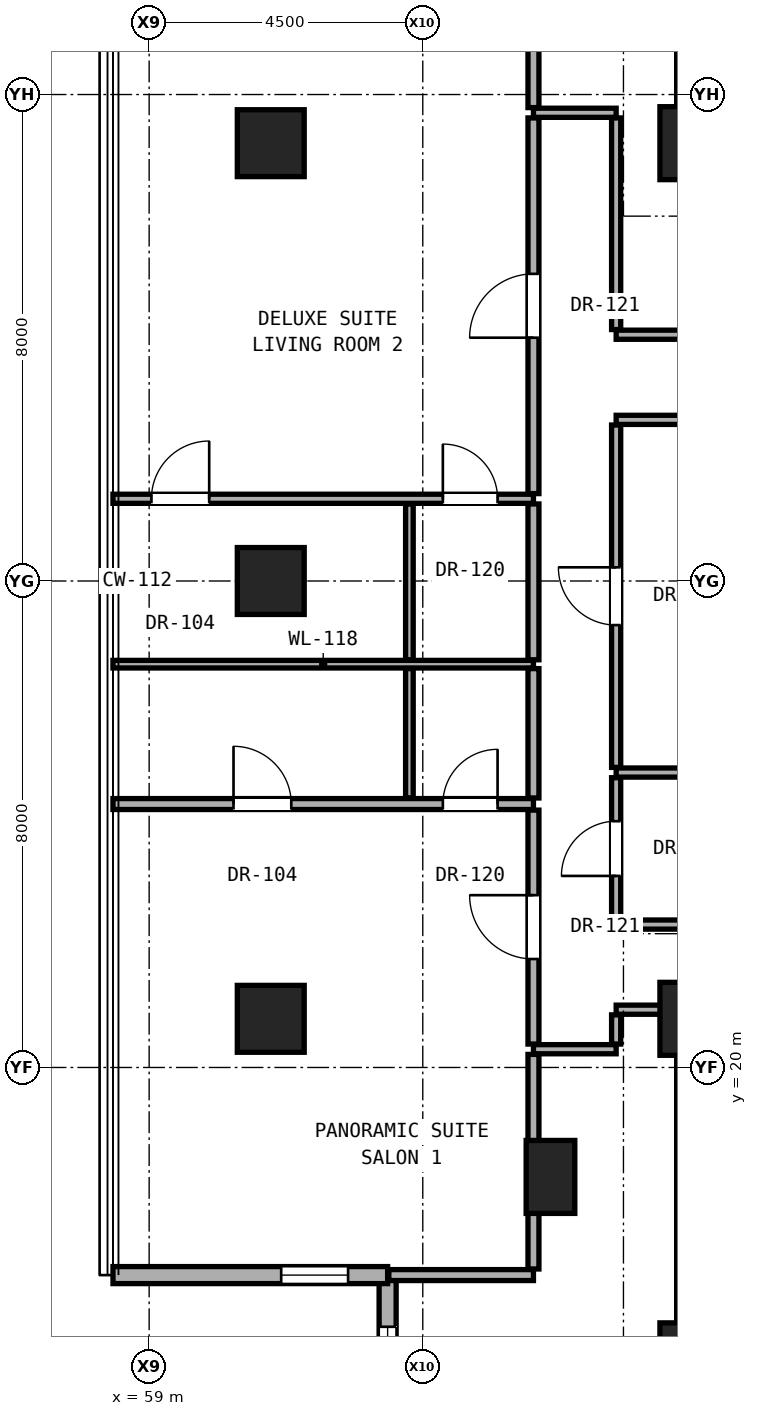
"""IFC4 building model, lengths in metres.
Left out: names, types, materials, properties, quantities, classifications, styles, units other than length and angle.
Written with IfcOpenShell. Run it as: python <this file> out.ifc"""

import sys

from ifc_helpers import new_model, si_unit, direction, frame, frame_2d, origin, origin_2d, place, context, subcontext, project, spatial, rectangle, hollow_rectangle, extrude, element, fill, save


model = new_model("IFC4")
c1 = context("Model", 3, precision=1e-05, world=origin(), true_north=direction((0.0, 1.0)))
c2 = subcontext(c1, "Body", "Model", "MODEL_VIEW")
j1 = project(units=[si_unit("LENGTHUNIT", "METRE"), si_unit("PLANEANGLEUNIT", "RADIAN")], contexts=[c1])
p1 = place(None, origin())
s1 = spatial("IfcSite", under=j1, at=p1, CompositionType="ELEMENT")
p2 = place(p1, origin())
s2 = spatial("IfcBuilding", under=s1, at=p2, CompositionType="ELEMENT")
p3 = place(p2, frame((0.0, 0.0, 101.6)))
s3 = spatial("IfcBuildingStorey", under=s2, at=p3, CompositionType="ELEMENT", Elevation=101.6)
for number, where, z_axis, x_axis in (
    (1, (68.0, 15.2, 0.0), (0.0, 0.0, 1.0), (1.0, 0.0, 0.0)),
    (2, (68.0, 20.8, 0.0), (0.0, 0.0, 1.0), (1.0, 0.0, 0.0)),
    (3, (68.0, 35.2, 0.0), (0.0, 0.0, 1.0), (1.0, 0.0, 0.0)),
):
    element("IfcColumn", number, at=place(p3, frame(where, z_axis=z_axis, x_axis=x_axis)), inside=s3, PredefinedType="COLUMN", context=c2, shape_type="SweptSolid", body=[
        extrude(rectangle(XDim=1.2, YDim=1.2, at=origin_2d()), origin(), (0.0, 0.0, 1.0), 3.3),
    ])
for number, where, z_axis, x_axis in (
    (4, (61.0, 20.8, 0.0), (0.0, 0.0, 1.0), (1.0, 0.0, 0.0)),
    (5, (61.0, 28.0, 0.0), (0.0, 0.0, 1.0), (1.0, 0.0, 0.0)),
    (6, (61.0, 35.2, 0.0), (0.0, 0.0, 1.0), (1.0, 0.0, 0.0)),
):
    element("IfcColumn", number, at=place(p3, frame(where, z_axis=z_axis, x_axis=x_axis)), inside=s3, PredefinedType="COLUMN", context=c2, shape_type="SweptSolid", body=[
        extrude(hollow_rectangle(XDim=1.1, YDim=1.1, WallThickness=0.06, at=origin_2d()), origin(), (0.0, 0.0, 1.0), 3.3),
    ])
p4 = place(p3, frame((65.6, 18.2, 0.0), z_axis=(0.0, 0.0, 1.0), x_axis=(1.0, 0.0, 0.0)))
e7 = element("IfcColumn", 7, at=p4, inside=s3, PredefinedType="PILASTER", context=c2, shape_type="SweptSolid", body=[
    extrude(rectangle(XDim=0.8, YDim=1.2, at=origin_2d()), origin(), (0.0, 0.0, 1.0), 3.3),
])
for number, where, z_axis, x_axis in (
    (8, (68.0, 35.2, 0.0), (0.0, 0.0, 1.0), (0.0, 1.0, 0.0)),
    (9, (68.0, 15.2, 0.0), (0.0, 0.0, 1.0), (0.0, 1.0, 0.0)),
):
    element("IfcWall", number, at=place(p3, frame(where, z_axis=z_axis, x_axis=x_axis)), inside=s3, PredefinedType="SHEAR", context=c2, shape_type="SweptSolid", body=[
        extrude(rectangle(XDim=5.6, YDim=0.65, at=frame_2d((2.8, 0.0))), origin(), (0.0, 0.0, 1.0), 3.08),
    ])
p5 = place(p3, frame((62.922, 16.586, 0.0), z_axis=(0.0, 0.0, 1.0), x_axis=(0.0, -1.0, 0.0)))
e10 = element("IfcWall", 10, at=p5, inside=s3, PredefinedType="SOLIDWALL", context=c2, shape_type="SweptSolid", body=[
    extrude(rectangle(XDim=4.516, YDim=0.28, at=frame_2d((2.258, 0.0))), origin(), (0.0, 0.0, 1.0), 3.06),
])
p6 = place(p5, frame((0.85, 0.0, 0.81)))
e11 = element("IfcOpeningElement", 11, at=p6, cuts=e10, PredefinedType="OPENING", context=c2, shape_type="SweptSolid", body=[
    extrude(rectangle(XDim=1.5, YDim=2.1, at=frame_2d((0.75, 1.05))), frame((0.0, 0.15, 0.0), z_axis=(0.0, -1.0, 0.0), x_axis=(1.0, 0.0, 0.0)), (0.0, 0.0, 1.0), 0.3),
])
p7 = place(p3, frame((58.406, 16.586, 0.0), z_axis=(0.0, 0.0, 1.0), x_axis=(1.0, 0.0, 0.0)))
e12 = element("IfcWall", 12, at=p7, inside=s3, PredefinedType="SOLIDWALL", context=c2, shape_type="SweptSolid", body=[
    extrude(rectangle(XDim=4.516, YDim=0.28, at=frame_2d((2.258, 0.0))), origin(), (0.0, 0.0, 1.0), 3.06),
])
p8 = place(p7, frame((2.766, 0.0, 0.85)))
e13 = element("IfcOpeningElement", 13, at=p8, cuts=e12, PredefinedType="OPENING", context=c2, shape_type="SweptSolid", body=[
    extrude(rectangle(XDim=1.1, YDim=2.0, at=frame_2d((0.55, 1.0))), frame((0.0, 0.15, 0.0), z_axis=(0.0, -1.0, 0.0), x_axis=(1.0, 0.0, 0.0)), (0.0, 0.0, 1.0), 0.3),
])
p9 = place(p3, frame((62.942, 16.586, 0.0), z_axis=(0.0, 0.0, 1.0), x_axis=(1.0, 0.0, 0.0)))
e14 = element("IfcWall", 14, at=p9, inside=s3, PredefinedType="PARTITIONING", context=c2, shape_type="SweptSolid", body=[
    extrude(rectangle(XDim=2.378, YDim=0.18, at=frame_2d((1.189, 0.0))), origin(), (0.0, 0.0, 1.0), 3.08),
])
p10 = place(p3, frame((65.32, 20.3, 0.0), z_axis=(0.0, 0.0, 1.0), x_axis=(1.0, 0.0, 0.0)))
e15 = element("IfcWall", 15, at=p10, inside=s3, PredefinedType="PARTITIONING", context=c2, shape_type="SweptSolid", body=[
    extrude(rectangle(XDim=1.36, YDim=0.15, at=frame_2d((0.68, 0.0))), origin(), (0.0, 0.0, 1.0), 3.08),
])
p11 = place(p3, frame((66.68, 20.95, 0.0), z_axis=(0.0, 0.0, 1.0), x_axis=(1.0, 0.0, 0.0)))
e16 = element("IfcWall", 16, at=p11, inside=s3, PredefinedType="PARTITIONING", context=c2, shape_type="SweptSolid", body=[
    extrude(rectangle(XDim=1.0, YDim=0.15, at=frame_2d((0.5, 0.0))), origin(), (0.0, 0.0, 1.0), 2.472),
])
p12 = place(p3, frame((66.68, 22.35, 0.0), z_axis=(0.0, 0.0, 1.0), x_axis=(1.0, 0.0, 0.0)))
e17 = element("IfcWall", 17, at=p12, inside=s3, PredefinedType="PARTITIONING", context=c2, shape_type="SweptSolid", body=[
    extrude(rectangle(XDim=19.5, YDim=0.15, at=frame_2d((9.75, 0.0))), origin(), (0.0, 0.0, 1.0), 2.145),
])
p13 = place(p12, frame((8.902, 0.0, 0.0)))
e18 = element("IfcOpeningElement", 18, at=p13, cuts=e17, PredefinedType="OPENING", context=c2, shape_type="SweptSolid", body=[
    extrude(rectangle(XDim=0.85, YDim=2.01, at=frame_2d((0.425, 1.005))), frame((0.0, 0.085, 0.0), z_axis=(0.0, -1.0, 0.0), x_axis=(1.0, 0.0, 0.0)), (0.0, 0.0, 1.0), 0.17),
])
p14 = place(p12, frame((15.947, 0.0, 0.0)))
e19 = element("IfcOpeningElement", 19, at=p14, cuts=e17, PredefinedType="OPENING", context=c2, shape_type="SweptSolid", body=[
    extrude(rectangle(XDim=0.85, YDim=2.01, at=frame_2d((0.425, 1.005))), frame((0.0, 0.085, 0.0), z_axis=(0.0, -1.0, 0.0), x_axis=(1.0, 0.0, 0.0)), (0.0, 0.0, 1.0), 0.17),
])
p15 = place(p3, frame((58.405, 24.332, 0.0), z_axis=(0.0, 0.0, 1.0), x_axis=(1.0, 0.0, 0.0)))
e20 = element("IfcWall", 20, at=p15, inside=s3, PredefinedType="PARTITIONING", context=c2, shape_type="SweptSolid", body=[
    extrude(rectangle(XDim=6.915, YDim=0.18, at=frame_2d((3.458, 0.0))), origin(), (0.0, 0.0, 1.0), 2.216),
])
p16 = place(p15, frame((1.982, 0.0, 0.0)))
e21 = element("IfcOpeningElement", 21, at=p16, cuts=e20, PredefinedType="OPENING", context=c2, shape_type="SweptSolid", body=[
    extrude(rectangle(XDim=0.95, YDim=2.15, at=frame_2d((0.475, 1.075))), frame((0.0, 0.1, 0.0), z_axis=(0.0, -1.0, 0.0), x_axis=(1.0, 0.0, 0.0)), (0.0, 0.0, 1.0), 0.2),
])
p17 = place(p15, frame((5.425, 0.0, 0.0)))
e22 = element("IfcOpeningElement", 22, at=p17, cuts=e20, PredefinedType="OPENING", context=c2, shape_type="SweptSolid", body=[
    extrude(rectangle(XDim=0.9, YDim=2.1, at=frame_2d((0.45, 1.05))), frame((0.0, 0.1, 0.0), z_axis=(0.0, -1.0, 0.0), x_axis=(1.0, 0.0, 0.0)), (0.0, 0.0, 1.0), 0.2),
])
p18 = place(p3, frame((66.68, 24.85, 0.0), z_axis=(0.0, 0.0, 1.0), x_axis=(1.0, 0.0, 0.0)))
e23 = element("IfcWall", 23, at=p18, inside=s3, PredefinedType="PARTITIONING", context=c2, shape_type="SweptSolid", body=[
    extrude(rectangle(XDim=3.07, YDim=0.15, at=frame_2d((1.535, 0.0))), origin(), (0.0, 0.0, 1.0), 2.145),
])
p19 = place(p3, frame((58.405, 26.632, 0.0), z_axis=(0.0, 0.0, 1.0), x_axis=(1.0, 0.0, 0.0)))
e24 = element("IfcWall", 24, at=p19, inside=s3, PredefinedType="PARTITIONING", context=c2, shape_type="SweptSolid", body=[
    extrude(rectangle(XDim=6.915, YDim=0.125, at=frame_2d((3.458, 0.0))), origin(), (0.0, 0.0, 1.0), 2.216),
])
p20 = place(p3, frame((58.405, 29.352, 0.0), z_axis=(0.0, 0.0, 1.0), x_axis=(1.0, 0.0, 0.0)))
e25 = element("IfcWall", 25, at=p20, inside=s3, PredefinedType="PARTITIONING", context=c2, shape_type="SweptSolid", body=[
    extrude(rectangle(XDim=6.915, YDim=0.15, at=frame_2d((3.458, 0.0))), origin(), (0.0, 0.0, 1.0), 2.216),
])
p21 = place(p20, frame((0.633, 0.0, 0.0)))
e26 = element("IfcOpeningElement", 26, at=p21, cuts=e25, PredefinedType="OPENING", context=c2, shape_type="SweptSolid", body=[
    extrude(rectangle(XDim=0.95, YDim=2.15, at=frame_2d((0.475, 1.075))), frame((0.0, 0.085, 0.0), z_axis=(0.0, -1.0, 0.0), x_axis=(1.0, 0.0, 0.0)), (0.0, 0.0, 1.0), 0.17),
])
p22 = place(p20, frame((5.425, 0.0, 0.0)))
e27 = element("IfcOpeningElement", 27, at=p22, cuts=e25, PredefinedType="OPENING", context=c2, shape_type="SweptSolid", body=[
    extrude(rectangle(XDim=0.9, YDim=2.1, at=frame_2d((0.45, 1.05))), frame((0.0, 0.085, 0.0), z_axis=(0.0, -1.0, 0.0), x_axis=(1.0, 0.0, 0.0)), (0.0, 0.0, 1.0), 0.17),
])
p23 = place(p3, frame((66.68, 30.65, 0.0), z_axis=(0.0, 0.0, 1.0), x_axis=(1.0, 0.0, 0.0)))
e28 = element("IfcWall", 28, at=p23, inside=s3, PredefinedType="PARTITIONING", context=c2, shape_type="SweptSolid", body=[
    extrude(rectangle(XDim=19.5, YDim=0.15, at=frame_2d((9.75, 0.0))), origin(), (0.0, 0.0, 1.0), 2.145),
])
p24 = place(p23, frame((3.795, 0.0, 0.0)))
e29 = element("IfcOpeningElement", 29, at=p24, cuts=e28, PredefinedType="OPENING", context=c2, shape_type="SweptSolid", body=[
    extrude(rectangle(XDim=0.85, YDim=2.01, at=frame_2d((0.425, 1.005))), frame((0.0, 0.085, 0.0), z_axis=(0.0, -1.0, 0.0), x_axis=(1.0, 0.0, 0.0)), (0.0, 0.0, 1.0), 0.17),
])
p25 = place(p23, frame((8.902, 0.0, 0.0)))
e30 = element("IfcOpeningElement", 30, at=p25, cuts=e28, PredefinedType="OPENING", context=c2, shape_type="SweptSolid", body=[
    extrude(rectangle(XDim=0.85, YDim=2.01, at=frame_2d((0.425, 1.005))), frame((0.0, 0.085, 0.0), z_axis=(0.0, -1.0, 0.0), x_axis=(1.0, 0.0, 0.0)), (0.0, 0.0, 1.0), 0.17),
])
p26 = place(p23, frame((15.947, 0.0, 0.0)))
e31 = element("IfcOpeningElement", 31, at=p26, cuts=e28, PredefinedType="OPENING", context=c2, shape_type="SweptSolid", body=[
    extrude(rectangle(XDim=0.85, YDim=2.01, at=frame_2d((0.425, 1.005))), frame((0.0, 0.085, 0.0), z_axis=(0.0, -1.0, 0.0), x_axis=(1.0, 0.0, 0.0)), (0.0, 0.0, 1.0), 0.17),
])
p27 = place(p3, frame((66.68, 32.05, 0.0), z_axis=(0.0, 0.0, 1.0), x_axis=(1.0, 0.0, 0.0)))
e32 = element("IfcWall", 32, at=p27, inside=s3, PredefinedType="PARTITIONING", context=c2, shape_type="SweptSolid", body=[
    extrude(rectangle(XDim=2.12, YDim=0.15, at=frame_2d((1.06, 0.0))), origin(), (0.0, 0.0, 1.0), 2.145),
])
p28 = place(p3, frame((65.32, 35.7, 0.0), z_axis=(0.0, 0.0, 1.0), x_axis=(1.0, 0.0, 0.0)))
e33 = element("IfcWall", 33, at=p28, inside=s3, PredefinedType="PARTITIONING", context=c2, shape_type="SweptSolid", body=[
    extrude(rectangle(XDim=1.36, YDim=0.15, at=frame_2d((0.68, 0.0))), origin(), (0.0, 0.0, 1.0), 3.08),
])
p29 = place(p3, frame((63.28, 24.432, 0.0), z_axis=(0.0, 0.0, 1.0), x_axis=(0.0, 1.0, 0.0)))
e34 = element("IfcWall", 34, at=p29, inside=s3, PredefinedType="PARTITIONING", context=c2, shape_type="SweptSolid", body=[
    extrude(rectangle(XDim=2.128, YDim=0.125, at=frame_2d((1.064, 0.0))), origin(), (0.0, 0.0, 1.0), 3.08),
])
p30 = place(p3, frame((63.28, 26.705, 0.0), z_axis=(0.0, 0.0, 1.0), x_axis=(0.0, 1.0, 0.0)))
e35 = element("IfcWall", 35, at=p30, inside=s3, PredefinedType="PARTITIONING", context=c2, shape_type="SweptSolid", body=[
    extrude(rectangle(XDim=2.562, YDim=0.125, at=frame_2d((1.281, 0.0))), origin(), (0.0, 0.0, 1.0), 2.299),
])
p31 = place(p3, frame((65.32, 16.686, 0.0), z_axis=(0.0, 0.0, 1.0), x_axis=(0.0, 1.0, 0.0)))
e36 = element("IfcWall", 36, at=p31, inside=s3, PredefinedType="PARTITIONING", context=c2, shape_type="SweptSolid", body=[
    extrude(rectangle(XDim=3.529, YDim=0.18, at=frame_2d((1.765, 0.0))), origin(), (0.0, 0.0, 1.0), 2.456),
])
p32 = place(p3, frame((65.32, 20.385, 0.0), z_axis=(0.0, 0.0, 1.0), x_axis=(0.0, 1.0, 0.0)))
e37 = element("IfcWall", 37, at=p32, inside=s3, PredefinedType="PARTITIONING", context=c2, shape_type="SweptSolid", body=[
    extrude(rectangle(XDim=3.847, YDim=0.18, at=frame_2d((1.923, 0.0))), origin(), (0.0, 0.0, 1.0), 2.472),
])
p33 = place(p32, frame((1.398, 0.0, 0.0)))
e38 = element("IfcOpeningElement", 38, at=p33, cuts=e37, PredefinedType="OPENING", context=c2, shape_type="SweptSolid", body=[
    extrude(rectangle(XDim=1.05, YDim=2.2, at=frame_2d((0.525, 1.1))), frame((0.0, 0.1, 0.0), z_axis=(0.0, -1.0, 0.0), x_axis=(1.0, 0.0, 0.0)), (0.0, 0.0, 1.0), 0.2),
])
p34 = place(p3, frame((65.32, 24.432, 0.0), z_axis=(0.0, 0.0, 1.0), x_axis=(0.0, 1.0, 0.0)))
e39 = element("IfcWall", 39, at=p34, inside=s3, PredefinedType="PARTITIONING", context=c2, shape_type="SweptSolid", body=[
    extrude(rectangle(XDim=2.128, YDim=0.18, at=frame_2d((1.064, 0.0))), origin(), (0.0, 0.0, 1.0), 3.08),
])
p35 = place(p3, frame((65.32, 26.705, 0.0), z_axis=(0.0, 0.0, 1.0), x_axis=(0.0, 1.0, 0.0)))
e40 = element("IfcWall", 40, at=p35, inside=s3, PredefinedType="PARTITIONING", context=c2, shape_type="SweptSolid", body=[
    extrude(rectangle(XDim=2.562, YDim=0.18, at=frame_2d((1.281, 0.0))), origin(), (0.0, 0.0, 1.0), 2.299),
])
p36 = place(p3, frame((65.32, 29.437, 0.0), z_axis=(0.0, 0.0, 1.0), x_axis=(0.0, 1.0, 0.0)))
e41 = element("IfcWall", 41, at=p36, inside=s3, PredefinedType="PARTITIONING", context=c2, shape_type="SweptSolid", body=[
    extrude(rectangle(XDim=6.178, YDim=0.18, at=frame_2d((3.089, 0.0))), origin(), (0.0, 0.0, 1.0), 2.472),
])
p37 = place(p36, frame((2.564, 0.0, 0.0)))
e42 = element("IfcOpeningElement", 42, at=p37, cuts=e41, PredefinedType="OPENING", context=c2, shape_type="SweptSolid", body=[
    extrude(rectangle(XDim=1.05, YDim=2.2, at=frame_2d((0.525, 1.1))), frame((0.0, 0.1, 0.0), z_axis=(0.0, -1.0, 0.0), x_axis=(1.0, 0.0, 0.0)), (0.0, 0.0, 1.0), 0.2),
])
p38 = place(p3, frame((65.32, 35.785, 0.0), z_axis=(0.0, 0.0, 1.0), x_axis=(0.0, 1.0, 0.0)))
e43 = element("IfcWall", 43, at=p38, inside=s3, PredefinedType="PARTITIONING", context=c2, shape_type="SweptSolid", body=[
    extrude(rectangle(XDim=3.544, YDim=0.18, at=frame_2d((1.772, 0.0))), origin(), (0.0, 0.0, 1.0), 2.456),
])
p39 = place(p3, frame((66.68, 20.385, 0.0), z_axis=(0.0, 0.0, 1.0), x_axis=(0.0, 1.0, 0.0)))
e44 = element("IfcWall", 44, at=p39, inside=s3, PredefinedType="PARTITIONING", context=c2, shape_type="SweptSolid", body=[
    extrude(rectangle(XDim=0.48, YDim=0.15, at=frame_2d((0.24, 0.0))), origin(), (0.0, 0.0, 1.0), 2.472),
])
p40 = place(p3, frame((66.68, 22.435, 0.0), z_axis=(0.0, 0.0, 1.0), x_axis=(0.0, 1.0, 0.0)))
e45 = element("IfcWall", 45, at=p40, inside=s3, PredefinedType="PARTITIONING", context=c2, shape_type="SweptSolid", body=[
    extrude(rectangle(XDim=2.33, YDim=0.15, at=frame_2d((1.165, 0.0))), origin(), (0.0, 0.0, 1.0), 3.08),
])
p41 = place(p40, frame((0.715, 0.0, 0.0)))
e46 = element("IfcOpeningElement", 46, at=p41, cuts=e45, PredefinedType="OPENING", context=c2, shape_type="SweptSolid", body=[
    extrude(rectangle(XDim=0.9, YDim=2.1, at=frame_2d((0.45, 1.05))), frame((0.0, 0.085, 0.0), z_axis=(0.0, -1.0, 0.0), x_axis=(1.0, 0.0, 0.0)), (0.0, 0.0, 1.0), 0.17),
])
p42 = place(p3, frame((66.68, 24.935, 0.0), z_axis=(0.0, 0.0, 1.0), x_axis=(0.0, 1.0, 0.0)))
e47 = element("IfcWall", 47, at=p42, inside=s3, PredefinedType="PARTITIONING", context=c2, shape_type="SweptSolid", body=[
    extrude(rectangle(XDim=5.63, YDim=0.15, at=frame_2d((2.815, 0.0))), origin(), (0.0, 0.0, 1.0), 2.299),
])
p43 = place(p42, frame((2.34, 0.0, 0.0)))
e48 = element("IfcOpeningElement", 48, at=p43, cuts=e47, PredefinedType="OPENING", context=c2, shape_type="SweptSolid", body=[
    extrude(rectangle(XDim=0.95, YDim=2.15, at=frame_2d((0.475, 1.075))), frame((0.0, 0.085, 0.0), z_axis=(0.0, -1.0, 0.0), x_axis=(1.0, 0.0, 0.0)), (0.0, 0.0, 1.0), 0.17),
])
p44 = place(p3, frame((66.68, 32.135, 0.0), z_axis=(0.0, 0.0, 1.0), x_axis=(0.0, 1.0, 0.0)))
e49 = element("IfcWall", 49, at=p44, inside=s3, PredefinedType="PARTITIONING", context=c2, shape_type="SweptSolid", body=[
    extrude(rectangle(XDim=3.48, YDim=0.15, at=frame_2d((1.74, 0.0))), origin(), (0.0, 0.0, 1.0), 2.472),
])
p45 = place(p6, origin())
e50 = element("IfcWindow", 50, at=p45, inside=s3, PartitioningType="SINGLE_PANEL", PredefinedType="WINDOW", context=c2, shape_type="SweptSolid", body=[
    extrude(rectangle(XDim=1.5, YDim=2.1, at=frame_2d((0.75, 1.05))), frame((0.0, 0.03, 0.0), z_axis=(0.0, -1.0, 0.0), x_axis=(1.0, 0.0, 0.0)), (0.0, 0.0, 1.0), 0.06),
])
fill(e11, e50)
p46 = place(p8, origin())
e51 = element("IfcWindow", 51, at=p46, inside=s3, PartitioningType="SINGLE_PANEL", PredefinedType="WINDOW", context=c2, shape_type="SweptSolid", body=[
    extrude(rectangle(XDim=1.1, YDim=2.0, at=frame_2d((0.55, 1.0))), frame((0.0, 0.03, 0.0), z_axis=(0.0, -1.0, 0.0), x_axis=(1.0, 0.0, 0.0)), (0.0, 0.0, 1.0), 0.06),
])
fill(e13, e51)
p47 = place(p41, origin())
e52 = element("IfcDoor", 52, at=p47, inside=s3, OperationType="SINGLE_SWING_LEFT", PredefinedType="DOOR", context=c2, shape_type="SweptSolid", body=[
    extrude(rectangle(XDim=0.9, YDim=2.1, at=frame_2d((0.45, 1.05))), frame((0.0, 0.025, 0.0), z_axis=(0.0, -1.0, 0.0), x_axis=(1.0, 0.0, 0.0)), (0.0, 0.0, 1.0), 0.05),
])
fill(e46, e52)
p48 = place(p33, origin())
e53 = element("IfcDoor", 53, at=p48, inside=s3, OperationType="SINGLE_SWING_RIGHT", PredefinedType="DOOR", context=c2, shape_type="SweptSolid", body=[
    extrude(rectangle(XDim=1.05, YDim=2.2, at=frame_2d((0.525, 1.1))), frame((0.0, 0.025, 0.0), z_axis=(0.0, -1.0, 0.0), x_axis=(1.0, 0.0, 0.0)), (0.0, 0.0, 1.0), 0.05),
])
fill(e38, e53)
p49 = place(p16, origin())
e54 = element("IfcDoor", 54, at=p49, inside=s3, OperationType="SINGLE_SWING_LEFT", PredefinedType="DOOR", context=c2, shape_type="SweptSolid", body=[
    extrude(rectangle(XDim=0.95, YDim=2.15, at=frame_2d((0.475, 1.075))), frame((0.0, 0.025, 0.0), z_axis=(0.0, -1.0, 0.0), x_axis=(1.0, 0.0, 0.0)), (0.0, 0.0, 1.0), 0.05),
])
fill(e21, e54)
p50 = place(p17, origin())
e55 = element("IfcDoor", 55, at=p50, inside=s3, OperationType="SINGLE_SWING_RIGHT", PredefinedType="DOOR", context=c2, shape_type="SweptSolid", body=[
    extrude(rectangle(XDim=0.9, YDim=2.1, at=frame_2d((0.45, 1.05))), frame((0.0, 0.025, 0.0), z_axis=(0.0, -1.0, 0.0), x_axis=(1.0, 0.0, 0.0)), (0.0, 0.0, 1.0), 0.05),
])
fill(e22, e55)
p51 = place(p37, origin())
e56 = element("IfcDoor", 56, at=p51, inside=s3, OperationType="SINGLE_SWING_LEFT", PredefinedType="DOOR", context=c2, shape_type="SweptSolid", body=[
    extrude(rectangle(XDim=1.05, YDim=2.2, at=frame_2d((0.525, 1.1))), frame((0.0, 0.025, 0.0), z_axis=(0.0, -1.0, 0.0), x_axis=(1.0, 0.0, 0.0)), (0.0, 0.0, 1.0), 0.05),
])
fill(e42, e56)
p52 = place(p21, origin())
e57 = element("IfcDoor", 57, at=p52, inside=s3, OperationType="SINGLE_SWING_RIGHT", PredefinedType="DOOR", context=c2, shape_type="SweptSolid", body=[
    extrude(rectangle(XDim=0.95, YDim=2.15, at=frame_2d((0.475, 1.075))), frame((0.0, 0.025, 0.0), z_axis=(0.0, -1.0, 0.0), x_axis=(1.0, 0.0, 0.0)), (0.0, 0.0, 1.0), 0.05),
])
fill(e26, e57)
p53 = place(p22, origin())
e58 = element("IfcDoor", 58, at=p53, inside=s3, OperationType="SINGLE_SWING_LEFT", PredefinedType="DOOR", context=c2, shape_type="SweptSolid", body=[
    extrude(rectangle(XDim=0.9, YDim=2.1, at=frame_2d((0.45, 1.05))), frame((0.0, 0.025, 0.0), z_axis=(0.0, -1.0, 0.0), x_axis=(1.0, 0.0, 0.0)), (0.0, 0.0, 1.0), 0.05),
])
fill(e27, e58)
p54 = place(p43, origin())
e59 = element("IfcDoor", 59, at=p54, inside=s3, OperationType="SINGLE_SWING_RIGHT", PredefinedType="DOOR", context=c2, shape_type="SweptSolid", body=[
    extrude(rectangle(XDim=0.95, YDim=2.15, at=frame_2d((0.475, 1.075))), frame((0.0, 0.025, 0.0), z_axis=(0.0, -1.0, 0.0), x_axis=(1.0, 0.0, 0.0)), (0.0, 0.0, 1.0), 0.05),
])
fill(e48, e59)
save(model, sys.argv[1])
